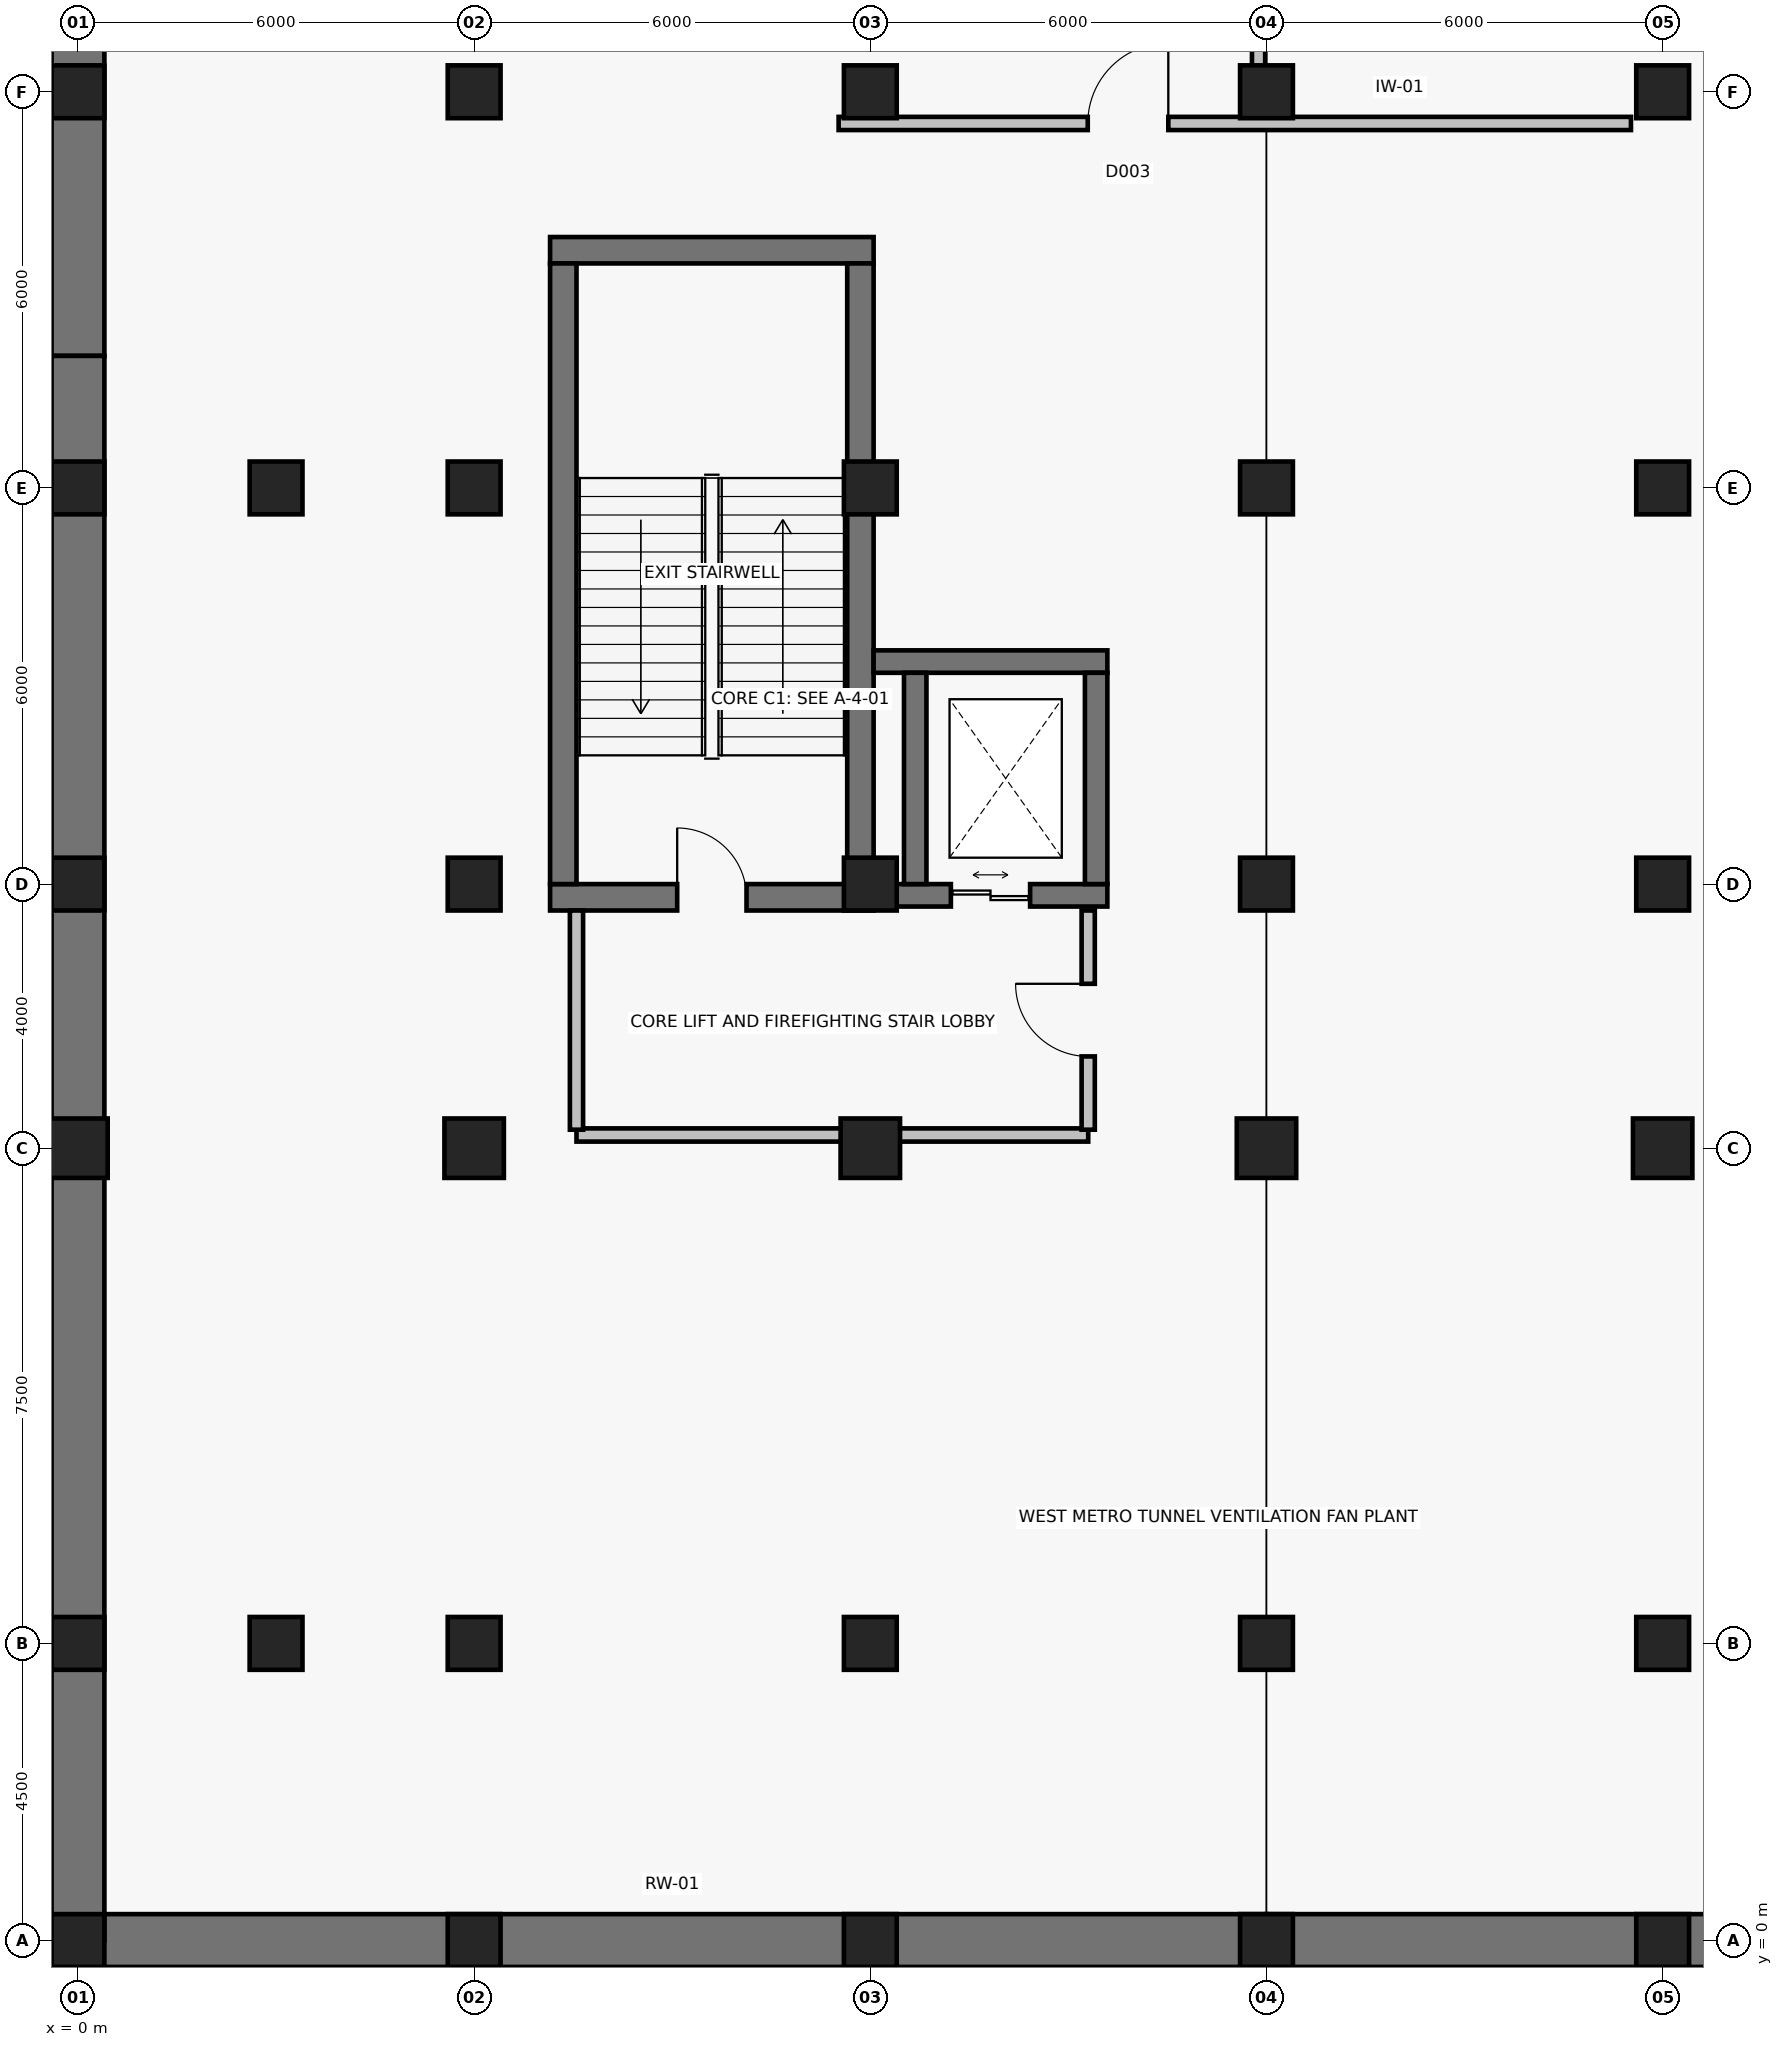
"""IFC4 building model, lengths in metres.
Left out: names, types, materials, properties, quantities, classifications, styles, units other than length and angle.
Written with IfcOpenShell. Run it as: python <this file> out.ifc"""

import sys

from ifc_helpers import new_model, si_unit, direction, frame, frame_2d, origin, origin_2d, place, context, subcontext, project, spatial, rectangle, extrude, element, fill, save


model = new_model("IFC4")
c1 = context("Model", 3, precision=1e-05, world=origin(), true_north=direction((0.0, 1.0)))
c2 = subcontext(c1, "Body", "Model", "MODEL_VIEW")
j1 = project(units=[si_unit("LENGTHUNIT", "METRE"), si_unit("PLANEANGLEUNIT", "RADIAN")], contexts=[c1])
p1 = place(None, origin())
s1 = spatial("IfcSite", under=j1, at=p1, CompositionType="ELEMENT")
p2 = place(p1, origin())
s2 = spatial("IfcBuilding", under=s1, at=p2, CompositionType="ELEMENT")
p3 = place(p2, frame((0.0, 0.0, -10.4)))
s3 = spatial("IfcBuildingStorey", under=s2, at=p3, CompositionType="ELEMENT", Elevation=-10.4)
for number, where, z_axis, x_axis in (
    (1, (0.0, 0.0, 0.0), (0.0, 0.0, 1.0), (1.0, 0.0, 0.0)),
    (2, (0.0, 4.5, 0.0), (0.0, 0.0, 1.0), (1.0, 0.0, 0.0)),
):
    element("IfcColumn", number, at=place(p3, frame(where, z_axis=z_axis, x_axis=x_axis)), inside=s3, PredefinedType="COLUMN", context=c2, shape_type="SweptSolid", body=[
        extrude(rectangle(XDim=0.8, YDim=0.8, at=origin_2d()), origin(), (0.0, 0.0, 1.0), 5.6),
    ])
p4 = place(p3, frame((0.0, 12.0, 0.0), z_axis=(0.0, 0.0, 1.0), x_axis=(1.0, 0.0, 0.0)))
e3 = element("IfcColumn", 3, at=p4, inside=s3, PredefinedType="COLUMN", context=c2, shape_type="SweptSolid", body=[
    extrude(rectangle(XDim=0.9, YDim=0.9, at=origin_2d()), origin(), (0.0, 0.0, 1.0), 5.6),
])
for number, where, z_axis, x_axis in (
    (4, (0.0, 16.0, 0.0), (0.0, 0.0, 1.0), (1.0, 0.0, 0.0)),
    (5, (0.0, 22.0, 0.0), (0.0, 0.0, 1.0), (1.0, 0.0, 0.0)),
    (6, (0.0, 28.0, 0.0), (0.0, 0.0, 1.0), (1.0, 0.0, 0.0)),
    (7, (3.0, 4.5, 0.0), (0.0, 0.0, 1.0), (1.0, 0.0, 0.0)),
    (8, (3.0, 22.0, 0.0), (0.0, 0.0, 1.0), (1.0, 0.0, 0.0)),
    (9, (6.0, 0.0, 0.0), (0.0, 0.0, 1.0), (1.0, 0.0, 0.0)),
    (10, (6.0, 4.5, 0.0), (0.0, 0.0, 1.0), (1.0, 0.0, 0.0)),
):
    element("IfcColumn", number, at=place(p3, frame(where, z_axis=z_axis, x_axis=x_axis)), inside=s3, PredefinedType="COLUMN", context=c2, shape_type="SweptSolid", body=[
        extrude(rectangle(XDim=0.8, YDim=0.8, at=origin_2d()), origin(), (0.0, 0.0, 1.0), 5.6),
    ])
p5 = place(p3, frame((6.0, 12.0, 0.0), z_axis=(0.0, 0.0, 1.0), x_axis=(1.0, 0.0, 0.0)))
e11 = element("IfcColumn", 11, at=p5, inside=s3, PredefinedType="COLUMN", context=c2, shape_type="SweptSolid", body=[
    extrude(rectangle(XDim=0.9, YDim=0.9, at=origin_2d()), origin(), (0.0, 0.0, 1.0), 5.6),
])
for number, where, z_axis, x_axis in (
    (12, (6.0, 16.0, 0.0), (0.0, 0.0, 1.0), (1.0, 0.0, 0.0)),
    (13, (6.0, 22.0, 0.0), (0.0, 0.0, 1.0), (1.0, 0.0, 0.0)),
    (14, (6.0, 28.0, 0.0), (0.0, 0.0, 1.0), (1.0, 0.0, 0.0)),
    (15, (12.0, 0.0, 0.0), (0.0, 0.0, 1.0), (1.0, 0.0, 0.0)),
    (16, (12.0, 4.5, 0.0), (0.0, 0.0, 1.0), (1.0, 0.0, 0.0)),
):
    element("IfcColumn", number, at=place(p3, frame(where, z_axis=z_axis, x_axis=x_axis)), inside=s3, PredefinedType="COLUMN", context=c2, shape_type="SweptSolid", body=[
        extrude(rectangle(XDim=0.8, YDim=0.8, at=origin_2d()), origin(), (0.0, 0.0, 1.0), 5.6),
    ])
p6 = place(p3, frame((12.0, 12.0, 0.0), z_axis=(0.0, 0.0, 1.0), x_axis=(1.0, 0.0, 0.0)))
e17 = element("IfcColumn", 17, at=p6, inside=s3, PredefinedType="COLUMN", context=c2, shape_type="SweptSolid", body=[
    extrude(rectangle(XDim=0.9, YDim=0.9, at=origin_2d()), origin(), (0.0, 0.0, 1.0), 5.6),
])
for number, where, z_axis, x_axis in (
    (18, (12.0, 16.0, 0.0), (0.0, 0.0, 1.0), (1.0, 0.0, 0.0)),
    (19, (12.0, 22.0, 0.0), (0.0, 0.0, 1.0), (1.0, 0.0, 0.0)),
    (20, (12.0, 28.0, 0.0), (0.0, 0.0, 1.0), (1.0, 0.0, 0.0)),
    (21, (18.0, 0.0, 0.0), (0.0, 0.0, 1.0), (1.0, 0.0, 0.0)),
    (22, (18.0, 4.5, 0.0), (0.0, 0.0, 1.0), (1.0, 0.0, 0.0)),
):
    element("IfcColumn", number, at=place(p3, frame(where, z_axis=z_axis, x_axis=x_axis)), inside=s3, PredefinedType="COLUMN", context=c2, shape_type="SweptSolid", body=[
        extrude(rectangle(XDim=0.8, YDim=0.8, at=origin_2d()), origin(), (0.0, 0.0, 1.0), 5.6),
    ])
p7 = place(p3, frame((18.0, 12.0, 0.0), z_axis=(0.0, 0.0, 1.0), x_axis=(1.0, 0.0, 0.0)))
e23 = element("IfcColumn", 23, at=p7, inside=s3, PredefinedType="COLUMN", context=c2, shape_type="SweptSolid", body=[
    extrude(rectangle(XDim=0.9, YDim=0.9, at=origin_2d()), origin(), (0.0, 0.0, 1.0), 5.6),
])
for number, where, z_axis, x_axis in (
    (24, (18.0, 16.0, 0.0), (0.0, 0.0, 1.0), (1.0, 0.0, 0.0)),
    (25, (18.0, 22.0, 0.0), (0.0, 0.0, 1.0), (1.0, 0.0, 0.0)),
    (26, (18.0, 28.0, 0.0), (0.0, 0.0, 1.0), (1.0, 0.0, 0.0)),
    (27, (24.0, 0.0, 0.0), (0.0, 0.0, 1.0), (1.0, 0.0, 0.0)),
    (28, (24.0, 4.5, 0.0), (0.0, 0.0, 1.0), (1.0, 0.0, 0.0)),
):
    element("IfcColumn", number, at=place(p3, frame(where, z_axis=z_axis, x_axis=x_axis)), inside=s3, PredefinedType="COLUMN", context=c2, shape_type="SweptSolid", body=[
        extrude(rectangle(XDim=0.8, YDim=0.8, at=origin_2d()), origin(), (0.0, 0.0, 1.0), 5.6),
    ])
p8 = place(p3, frame((24.0, 12.0, 0.0), z_axis=(0.0, 0.0, 1.0), x_axis=(1.0, 0.0, 0.0)))
e29 = element("IfcColumn", 29, at=p8, inside=s3, PredefinedType="COLUMN", context=c2, shape_type="SweptSolid", body=[
    extrude(rectangle(XDim=0.9, YDim=0.9, at=origin_2d()), origin(), (0.0, 0.0, 1.0), 5.6),
])
for number, where, z_axis, x_axis in (
    (30, (24.0, 16.0, 0.0), (0.0, 0.0, 1.0), (1.0, 0.0, 0.0)),
    (31, (24.0, 22.0, 0.0), (0.0, 0.0, 1.0), (1.0, 0.0, 0.0)),
    (32, (24.0, 28.0, 0.0), (0.0, 0.0, 1.0), (1.0, 0.0, 0.0)),
):
    element("IfcColumn", number, at=place(p3, frame(where, z_axis=z_axis, x_axis=x_axis)), inside=s3, PredefinedType="COLUMN", context=c2, shape_type="SweptSolid", body=[
        extrude(rectangle(XDim=0.8, YDim=0.8, at=origin_2d()), origin(), (0.0, 0.0, 1.0), 5.6),
    ])
for number, where, z_axis, x_axis in (
    (33, (0.0, 0.0, 0.0), (0.0, 0.0, 1.0), (1.0, 0.0, 0.0)),
    (34, (18.0, 0.0, 0.0), (0.0, 0.0, 1.0), (1.0, 0.0, 0.0)),
):
    element("IfcWall", number, at=place(p3, frame(where, z_axis=z_axis, x_axis=x_axis)), inside=s3, PredefinedType="USERDEFINED", context=c2, shape_type="SweptSolid", body=[
        extrude(rectangle(XDim=18.0, YDim=0.8, at=frame_2d((9.0, 0.0))), origin(), (0.0, 0.0, 1.0), 5.15),
    ])
for number, where, z_axis, x_axis in (
    (35, (0.0, 48.0, 0.0), (0.0, 0.0, 1.0), (0.0, -1.0, 0.0)),
    (36, (0.0, 24.0, 0.0), (0.0, 0.0, 1.0), (0.0, -1.0, 0.0)),
):
    element("IfcWall", number, at=place(p3, frame(where, z_axis=z_axis, x_axis=x_axis)), inside=s3, PredefinedType="USERDEFINED", context=c2, shape_type="SweptSolid", body=[
        extrude(rectangle(XDim=24.0, YDim=0.8, at=frame_2d((12.0, 0.0))), origin(), (0.0, 0.0, 1.0), 5.15),
    ])
p9 = place(p3, frame((7.15, 15.8, 0.0), z_axis=(0.0, 0.0, 1.0), x_axis=(1.0, 0.0, 0.0)))
e37 = element("IfcWall", 37, at=p9, inside=s3, PredefinedType="SHEAR", context=c2, shape_type="SweptSolid", body=[
    extrude(rectangle(XDim=4.9, YDim=0.4, at=frame_2d((2.45, 0.0))), origin(), (0.0, 0.0, 1.0), 5.15),
])
p10 = place(p9, frame((1.925, 0.0, 0.0)))
e38 = element("IfcOpeningElement", 38, at=p10, cuts=e37, PredefinedType="OPENING", context=c2, shape_type="SweptSolid", body=[
    extrude(rectangle(XDim=1.05, YDim=2.15, at=frame_2d((0.525, 1.075))), frame((0.0, 0.215, 0.0), z_axis=(0.0, -1.0, 0.0), x_axis=(1.0, 0.0, 0.0)), (0.0, 0.0, 1.0), 0.43),
])
p11 = place(p3, frame((12.05, 25.6, 0.0), z_axis=(0.0, 0.0, 1.0), x_axis=(-1.0, 0.0, 0.0)))
e39 = element("IfcWall", 39, at=p11, inside=s3, PredefinedType="SHEAR", context=c2, shape_type="SweptSolid", body=[
    extrude(rectangle(XDim=4.9, YDim=0.4, at=frame_2d((2.45, 0.0))), origin(), (0.0, 0.0, 1.0), 5.15),
])
for number, where, z_axis, x_axis in (
    (40, (7.35, 25.4, 0.0), (0.0, 0.0, 1.0), (0.0, -1.0, 0.0)),
    (41, (11.85, 16.0, 0.0), (0.0, 0.0, 1.0), (0.0, 1.0, 0.0)),
):
    element("IfcWall", number, at=place(p3, frame(where, z_axis=z_axis, x_axis=x_axis)), inside=s3, PredefinedType="SHEAR", context=c2, shape_type="SweptSolid", body=[
        extrude(rectangle(XDim=9.4, YDim=0.4, at=frame_2d((4.7, 0.0))), origin(), (0.0, 0.0, 1.0), 5.15),
    ])
p12 = place(p3, frame((12.05, 15.83, 0.0), z_axis=(0.0, 0.0, 1.0), x_axis=(1.0, 0.0, 0.0)))
e42 = element("IfcWall", 42, at=p12, inside=s3, PredefinedType="SHEAR", context=c2, shape_type="SweptSolid", body=[
    extrude(rectangle(XDim=3.54, YDim=0.34, at=frame_2d((1.77, 0.0))), origin(), (0.0, 0.0, 1.0), 5.15),
])
p13 = place(p12, frame((1.17, 0.0, 0.0)))
e43 = element("IfcOpeningElement", 43, at=p13, cuts=e42, PredefinedType="OPENING", context=c2, shape_type="SweptSolid", body=[
    extrude(rectangle(XDim=1.2, YDim=2.2, at=frame_2d((0.6, 1.1))), frame((0.0, 0.185, 0.0), z_axis=(0.0, -1.0, 0.0), x_axis=(1.0, 0.0, 0.0)), (0.0, 0.0, 1.0), 0.37),
])
p14 = place(p3, frame((15.59, 19.37, 0.0), z_axis=(0.0, 0.0, 1.0), x_axis=(-1.0, 0.0, 0.0)))
e44 = element("IfcWall", 44, at=p14, inside=s3, PredefinedType="SHEAR", context=c2, shape_type="SweptSolid", body=[
    extrude(rectangle(XDim=3.54, YDim=0.34, at=frame_2d((1.77, 0.0))), origin(), (0.0, 0.0, 1.0), 5.15),
])
for number, where, z_axis, x_axis in (
    (45, (12.68, 19.2, 0.0), (0.0, 0.0, 1.0), (0.0, -1.0, 0.0)),
    (46, (15.42, 16.0, 0.0), (0.0, 0.0, 1.0), (0.0, 1.0, 0.0)),
):
    element("IfcWall", number, at=place(p3, frame(where, z_axis=z_axis, x_axis=x_axis)), inside=s3, PredefinedType="SHEAR", context=c2, shape_type="SweptSolid", body=[
        extrude(rectangle(XDim=3.2, YDim=0.34, at=frame_2d((1.6, 0.0))), origin(), (0.0, 0.0, 1.0), 5.15),
    ])
p15 = place(p3, frame((7.55, 12.2, 0.0), z_axis=(0.0, 0.0, 1.0), x_axis=(1.0, 0.0, 0.0)))
e47 = element("IfcWall", 47, at=p15, inside=s3, PredefinedType="PARTITIONING", context=c2, shape_type="SweptSolid", body=[
    extrude(rectangle(XDim=7.75, YDim=0.2, at=frame_2d((3.875, 0.0))), origin(), (0.0, 0.0, 1.0), 4.68),
])
p16 = place(p3, frame((7.55, 15.6, 0.0), z_axis=(0.0, 0.0, 1.0), x_axis=(0.0, -1.0, 0.0)))
e48 = element("IfcWall", 48, at=p16, inside=s3, PredefinedType="PARTITIONING", context=c2, shape_type="SweptSolid", body=[
    extrude(rectangle(XDim=3.32, YDim=0.2, at=frame_2d((1.66, 0.0))), origin(), (0.0, 0.0, 1.0), 4.68),
])
p17 = place(p3, frame((15.3, 12.28, 0.0), z_axis=(0.0, 0.0, 1.0), x_axis=(0.0, 1.0, 0.0)))
e49 = element("IfcWall", 49, at=p17, inside=s3, PredefinedType="PARTITIONING", context=c2, shape_type="SweptSolid", body=[
    extrude(rectangle(XDim=3.32, YDim=0.2, at=frame_2d((1.66, 0.0))), origin(), (0.0, 0.0, 1.0), 4.68),
])
p18 = place(p17, frame((1.11, 0.0, 0.0)))
e50 = element("IfcOpeningElement", 50, at=p18, cuts=e49, PredefinedType="OPENING", context=c2, shape_type="SweptSolid", body=[
    extrude(rectangle(XDim=1.1, YDim=2.15, at=frame_2d((0.55, 1.075))), frame((0.0, 0.115, 0.0), z_axis=(0.0, -1.0, 0.0), x_axis=(1.0, 0.0, 0.0)), (0.0, 0.0, 1.0), 0.23),
])
p19 = place(p3, frame((11.52, 27.52, 0.0), z_axis=(0.0, 0.0, 1.0), x_axis=(1.0, 0.0, 0.0)))
e51 = element("IfcWall", 51, at=p19, inside=s3, PredefinedType="PARTITIONING", context=c2, shape_type="SweptSolid", body=[
    extrude(rectangle(XDim=12.0, YDim=0.2, at=frame_2d((6.0, 0.0))), origin(), (0.0, 0.0, 1.0), 4.68),
])
p20 = place(p19, frame((3.773, 0.0, 0.0)))
e52 = element("IfcOpeningElement", 52, at=p20, cuts=e51, PredefinedType="OPENING", context=c2, shape_type="SweptSolid", body=[
    extrude(rectangle(XDim=1.22, YDim=2.2, at=frame_2d((0.61, 1.1))), frame((0.0, 0.115, 0.0), z_axis=(0.0, -1.0, 0.0), x_axis=(1.0, 0.0, 0.0)), (0.0, 0.0, 1.0), 0.23),
])
p21 = place(p3, frame((17.88, 28.28, 0.0), z_axis=(0.0, 0.0, 1.0), x_axis=(0.0, 1.0, 0.0)))
e53 = element("IfcWall", 53, at=p21, inside=s3, PredefinedType="PARTITIONING", context=c2, shape_type="SweptSolid", body=[
    extrude(rectangle(XDim=27.04, YDim=0.2, at=frame_2d((13.52, 0.0))), origin(), (0.0, 0.0, 1.0), 4.68),
])
p22 = place(p21, frame((9.002, 0.0, 0.0)))
e54 = element("IfcOpeningElement", 54, at=p22, cuts=e53, PredefinedType="OPENING", context=c2, shape_type="SweptSolid", body=[
    extrude(rectangle(XDim=1.32, YDim=2.2, at=frame_2d((0.66, 1.1))), frame((0.0, 0.115, 0.0), z_axis=(0.0, -1.0, 0.0), x_axis=(1.0, 0.0, 0.0)), (0.0, 0.0, 1.0), 0.23),
])
p23 = place(p10, origin())
e55 = element("IfcDoor", 55, at=p23, inside=s3, OperationType="SINGLE_SWING_LEFT", PredefinedType="DOOR", context=c2, shape_type="SweptSolid", body=[
    extrude(rectangle(XDim=1.05, YDim=2.15, at=frame_2d((0.525, 1.075))), frame((0.0, 0.025, 0.0), z_axis=(0.0, -1.0, 0.0), x_axis=(1.0, 0.0, 0.0)), (0.0, 0.0, 1.0), 0.05),
])
fill(e38, e55)
p24 = place(p13, origin())
e56 = element("IfcDoor", 56, at=p24, inside=s3, OperationType="DOUBLE_DOOR_SLIDING", PredefinedType="DOOR", context=c2, shape_type="SweptSolid", body=[
    extrude(rectangle(XDim=1.2, YDim=2.2, at=frame_2d((0.6, 1.1))), frame((0.0, 0.025, 0.0), z_axis=(0.0, -1.0, 0.0), x_axis=(1.0, 0.0, 0.0)), (0.0, 0.0, 1.0), 0.05),
])
fill(e43, e56)
p25 = place(p18, origin())
e57 = element("IfcDoor", 57, at=p25, inside=s3, OperationType="SINGLE_SWING_RIGHT", PredefinedType="DOOR", context=c2, shape_type="SweptSolid", body=[
    extrude(rectangle(XDim=1.1, YDim=2.15, at=frame_2d((0.55, 1.075))), frame((0.0, 0.025, 0.0), z_axis=(0.0, -1.0, 0.0), x_axis=(1.0, 0.0, 0.0)), (0.0, 0.0, 1.0), 0.05),
])
fill(e50, e57)
p26 = place(p20, origin())
e58 = element("IfcDoor", 58, at=p26, inside=s3, OperationType="SINGLE_SWING_RIGHT", PredefinedType="DOOR", context=c2, shape_type="SweptSolid", body=[
    extrude(rectangle(XDim=1.22, YDim=2.2, at=frame_2d((0.61, 1.1))), frame((0.0, 0.025, 0.0), z_axis=(0.0, -1.0, 0.0), x_axis=(1.0, 0.0, 0.0)), (0.0, 0.0, 1.0), 0.05),
])
fill(e52, e58)
save(model, sys.argv[1])
